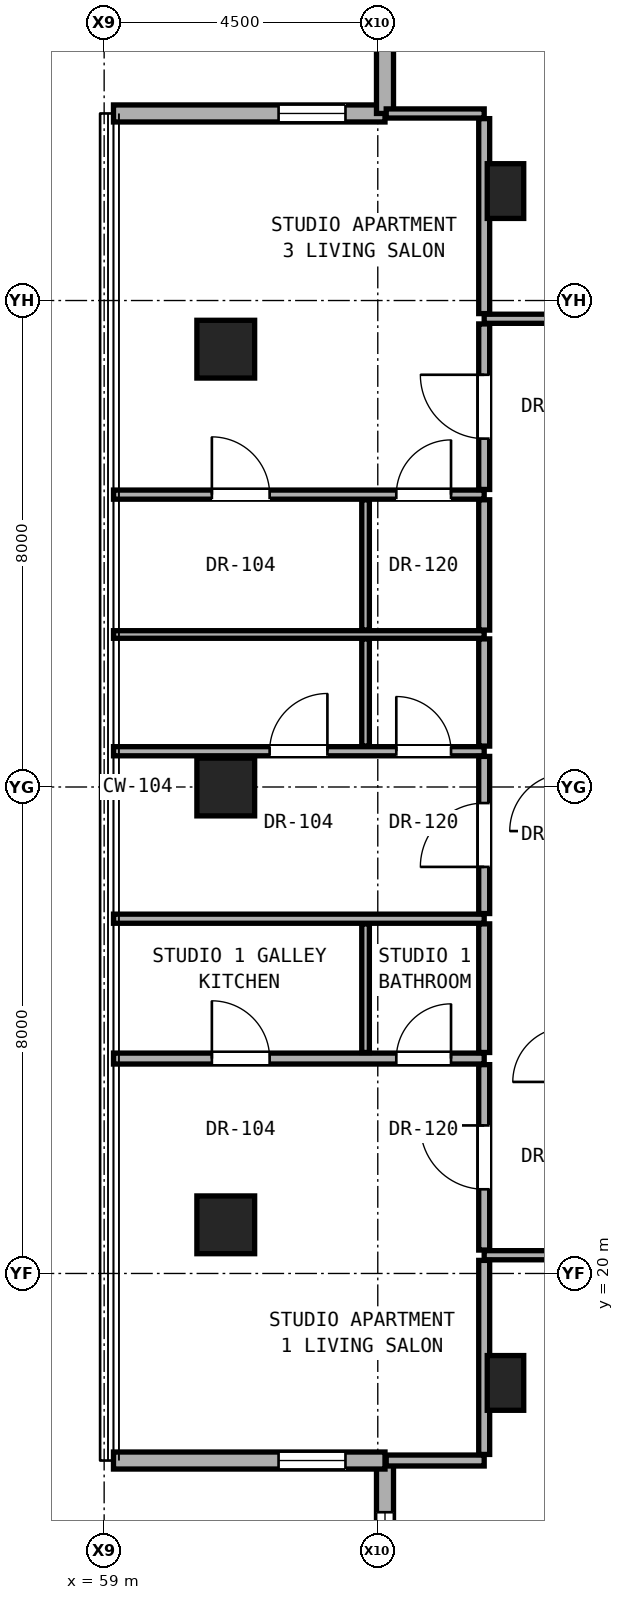
"""IFC4 building model, lengths in metres.
Left out: names, types, materials, properties, quantities, classifications, styles, units other than length and angle.
Written with IfcOpenShell. Run it as: python <this file> out.ifc"""

import sys

from ifc_helpers import new_model, si_unit, direction, frame, frame_2d, origin, origin_2d, place, context, subcontext, project, spatial, rectangle, hollow_rectangle, extrude, element, fill, save


model = new_model("IFC4")
c1 = context("Model", 3, precision=1e-05, world=origin(), true_north=direction((0.0, 1.0)))
c2 = subcontext(c1, "Body", "Model", "MODEL_VIEW")
j1 = project(units=[si_unit("LENGTHUNIT", "METRE"), si_unit("PLANEANGLEUNIT", "RADIAN")], contexts=[c1])
p1 = place(None, origin())
s1 = spatial("IfcSite", under=j1, at=p1, CompositionType="ELEMENT")
p2 = place(p1, origin())
s2 = spatial("IfcBuilding", under=s1, at=p2, CompositionType="ELEMENT")
p3 = place(p2, frame((0.0, 0.0, 164.15)))
s3 = spatial("IfcBuildingStorey", under=s2, at=p3, CompositionType="ELEMENT", Elevation=164.15)
for number, where, z_axis, x_axis in (
    (1, (61.0, 20.8, 0.0), (0.0, 0.0, 1.0), (1.0, 0.0, 0.0)),
    (2, (61.0, 28.0, 0.0), (0.0, 0.0, 1.0), (1.0, 0.0, 0.0)),
    (3, (61.0, 35.2, 0.0), (0.0, 0.0, 1.0), (1.0, 0.0, 0.0)),
):
    element("IfcColumn", number, at=place(p3, frame(where, z_axis=z_axis, x_axis=x_axis)), inside=s3, PredefinedType="COLUMN", context=c2, shape_type="SweptSolid", body=[
        extrude(hollow_rectangle(XDim=0.95, YDim=0.95, WallThickness=0.05, at=origin_2d()), origin(), (0.0, 0.0, 1.0), 3.25),
    ])
for number, where, z_axis, x_axis in (
    (4, (65.6, 18.2, 0.0), (0.0, 0.0, 1.0), (1.0, 0.0, 0.0)),
    (5, (65.6, 37.8, 0.0), (0.0, 0.0, 1.0), (1.0, 0.0, 0.0)),
):
    element("IfcColumn", number, at=place(p3, frame(where, z_axis=z_axis, x_axis=x_axis)), inside=s3, PredefinedType="PILASTER", context=c2, shape_type="SweptSolid", body=[
        extrude(rectangle(XDim=0.6, YDim=0.9, at=origin_2d()), origin(), (0.0, 0.0, 1.0), 3.25),
    ])
p4 = place(p3, frame((63.619, 16.924, 0.0), z_axis=(0.0, 0.0, 1.0), x_axis=(0.0, -1.0, 0.0)))
e6 = element("IfcWall", 6, at=p4, inside=s3, PredefinedType="SOLIDWALL", context=c2, shape_type="SweptSolid", body=[
    extrude(rectangle(XDim=4.465, YDim=0.28, at=frame_2d((2.233, 0.0))), origin(), (0.0, 0.0, 1.0), 3.03),
])
p5 = place(p4, frame((0.85, 0.0, 0.68)))
e7 = element("IfcOpeningElement", 7, at=p5, cuts=e6, PredefinedType="OPENING", context=c2, shape_type="SweptSolid", body=[
    extrude(rectangle(XDim=1.35, YDim=2.2, at=frame_2d((0.675, 1.1))), frame((0.0, 0.15, 0.0), z_axis=(0.0, -1.0, 0.0), x_axis=(1.0, 0.0, 0.0)), (0.0, 0.0, 1.0), 0.3),
])
p6 = place(p3, frame((59.154, 16.924, 0.0), z_axis=(0.0, 0.0, 1.0), x_axis=(1.0, 0.0, 0.0)))
e8 = element("IfcWall", 8, at=p6, inside=s3, PredefinedType="SOLIDWALL", context=c2, shape_type="SweptSolid", body=[
    extrude(rectangle(XDim=4.465, YDim=0.28, at=frame_2d((2.232, 0.0))), origin(), (0.0, 0.0, 1.0), 3.03),
])
p7 = place(p6, frame((2.715, 0.0, 0.85)))
e9 = element("IfcOpeningElement", 9, at=p7, cuts=e8, PredefinedType="OPENING", context=c2, shape_type="SweptSolid", body=[
    extrude(rectangle(XDim=1.1, YDim=2.0, at=frame_2d((0.55, 1.0))), frame((0.0, 0.15, 0.0), z_axis=(0.0, -1.0, 0.0), x_axis=(1.0, 0.0, 0.0)), (0.0, 0.0, 1.0), 0.3),
])
p8 = place(p3, frame((63.619, 39.076, 0.0), z_axis=(0.0, 0.0, 1.0), x_axis=(-1.0, 0.0, 0.0)))
e10 = element("IfcWall", 10, at=p8, inside=s3, PredefinedType="SOLIDWALL", context=c2, shape_type="SweptSolid", body=[
    extrude(rectangle(XDim=4.465, YDim=0.28, at=frame_2d((2.232, 0.0))), origin(), (0.0, 0.0, 1.0), 3.03),
])
p9 = place(p8, frame((0.65, 0.0, 0.85)))
e11 = element("IfcOpeningElement", 11, at=p9, cuts=e10, PredefinedType="OPENING", context=c2, shape_type="SweptSolid", body=[
    extrude(rectangle(XDim=1.1, YDim=2.0, at=frame_2d((0.55, 1.0))), frame((0.0, 0.15, 0.0), z_axis=(0.0, -1.0, 0.0), x_axis=(1.0, 0.0, 0.0)), (0.0, 0.0, 1.0), 0.3),
])
p10 = place(p3, frame((63.619, 43.542, 0.0), z_axis=(0.0, 0.0, 1.0), x_axis=(0.0, -1.0, 0.0)))
e12 = element("IfcWall", 12, at=p10, inside=s3, PredefinedType="SOLIDWALL", context=c2, shape_type="SweptSolid", body=[
    extrude(rectangle(XDim=4.465, YDim=0.28, at=frame_2d((2.233, 0.0))), origin(), (0.0, 0.0, 1.0), 3.03),
])
p11 = place(p3, frame((63.639, 16.924, 0.0), z_axis=(0.0, 0.0, 1.0), x_axis=(1.0, 0.0, 0.0)))
e13 = element("IfcWall", 13, at=p11, inside=s3, PredefinedType="PARTITIONING", context=c2, shape_type="SweptSolid", body=[
    extrude(rectangle(XDim=1.611, YDim=0.18, at=frame_2d((0.806, 0.0))), origin(), (0.0, 0.0, 1.0), 3.05),
])
p12 = place(p3, frame((65.25, 20.3, 0.0), z_axis=(0.0, 0.0, 1.0), x_axis=(1.0, 0.0, 0.0)))
e14 = element("IfcWall", 14, at=p12, inside=s3, PredefinedType="PARTITIONING", context=c2, shape_type="SweptSolid", body=[
    extrude(rectangle(XDim=1.37, YDim=0.15, at=frame_2d((0.685, 0.0))), origin(), (0.0, 0.0, 1.0), 3.05),
])
p13 = place(p3, frame((59.154, 23.534, 0.0), z_axis=(0.0, 0.0, 1.0), x_axis=(1.0, 0.0, 0.0)))
e15 = element("IfcWall", 15, at=p13, inside=s3, PredefinedType="PARTITIONING", context=c2, shape_type="SweptSolid", body=[
    extrude(rectangle(XDim=6.096, YDim=0.18, at=frame_2d((3.048, 0.0))), origin(), (0.0, 0.0, 1.0), 2.269),
])
p14 = place(p13, frame((1.617, 0.0, 0.0)))
e16 = element("IfcOpeningElement", 16, at=p14, cuts=e15, PredefinedType="OPENING", context=c2, shape_type="SweptSolid", body=[
    extrude(rectangle(XDim=0.95, YDim=2.15, at=frame_2d((0.475, 1.075))), frame((0.0, 0.1, 0.0), z_axis=(0.0, -1.0, 0.0), x_axis=(1.0, 0.0, 0.0)), (0.0, 0.0, 1.0), 0.2),
])
p15 = place(p13, frame((4.65, 0.0, 0.0)))
e17 = element("IfcOpeningElement", 17, at=p15, cuts=e15, PredefinedType="OPENING", context=c2, shape_type="SweptSolid", body=[
    extrude(rectangle(XDim=0.9, YDim=2.1, at=frame_2d((0.45, 1.05))), frame((0.0, 0.1, 0.0), z_axis=(0.0, -1.0, 0.0), x_axis=(1.0, 0.0, 0.0)), (0.0, 0.0, 1.0), 0.2),
])
p16 = place(p3, frame((59.154, 25.834, 0.0), z_axis=(0.0, 0.0, 1.0), x_axis=(1.0, 0.0, 0.0)))
e18 = element("IfcWall", 18, at=p16, inside=s3, PredefinedType="PARTITIONING", context=c2, shape_type="SweptSolid", body=[
    extrude(rectangle(XDim=6.096, YDim=0.15, at=frame_2d((3.048, 0.0))), origin(), (0.0, 0.0, 1.0), 2.269),
])
p17 = place(p3, frame((59.154, 28.588, 0.0), z_axis=(0.0, 0.0, 1.0), x_axis=(1.0, 0.0, 0.0)))
e19 = element("IfcWall", 19, at=p17, inside=s3, PredefinedType="PARTITIONING", context=c2, shape_type="SweptSolid", body=[
    extrude(rectangle(XDim=6.096, YDim=0.15, at=frame_2d((3.048, 0.0))), origin(), (0.0, 0.0, 1.0), 2.269),
])
p18 = place(p17, frame((2.567, 0.0, 0.0)))
e20 = element("IfcOpeningElement", 20, at=p18, cuts=e19, PredefinedType="OPENING", context=c2, shape_type="SweptSolid", body=[
    extrude(rectangle(XDim=0.95, YDim=2.15, at=frame_2d((0.475, 1.075))), frame((0.0, 0.085, 0.0), z_axis=(0.0, -1.0, 0.0), x_axis=(1.0, 0.0, 0.0)), (0.0, 0.0, 1.0), 0.17),
])
p19 = place(p17, frame((4.65, 0.0, 0.0)))
e21 = element("IfcOpeningElement", 21, at=p19, cuts=e19, PredefinedType="OPENING", context=c2, shape_type="SweptSolid", body=[
    extrude(rectangle(XDim=0.9, YDim=2.1, at=frame_2d((0.45, 1.05))), frame((0.0, 0.085, 0.0), z_axis=(0.0, -1.0, 0.0), x_axis=(1.0, 0.0, 0.0)), (0.0, 0.0, 1.0), 0.17),
])
p20 = place(p3, frame((59.154, 30.508, 0.0), z_axis=(0.0, 0.0, 1.0), x_axis=(1.0, 0.0, 0.0)))
e22 = element("IfcWall", 22, at=p20, inside=s3, PredefinedType="PARTITIONING", context=c2, shape_type="SweptSolid", body=[
    extrude(rectangle(XDim=6.096, YDim=0.125, at=frame_2d((3.048, 0.0))), origin(), (0.0, 0.0, 1.0), 2.269),
])
p21 = place(p3, frame((59.154, 32.808, 0.0), z_axis=(0.0, 0.0, 1.0), x_axis=(1.0, 0.0, 0.0)))
e23 = element("IfcWall", 23, at=p21, inside=s3, PredefinedType="PARTITIONING", context=c2, shape_type="SweptSolid", body=[
    extrude(rectangle(XDim=6.096, YDim=0.15, at=frame_2d((3.048, 0.0))), origin(), (0.0, 0.0, 1.0), 2.269),
])
p22 = place(p21, frame((1.617, 0.0, 0.0)))
e24 = element("IfcOpeningElement", 24, at=p22, cuts=e23, PredefinedType="OPENING", context=c2, shape_type="SweptSolid", body=[
    extrude(rectangle(XDim=0.95, YDim=2.15, at=frame_2d((0.475, 1.075))), frame((0.0, 0.085, 0.0), z_axis=(0.0, -1.0, 0.0), x_axis=(1.0, 0.0, 0.0)), (0.0, 0.0, 1.0), 0.17),
])
p23 = place(p21, frame((4.65, 0.0, 0.0)))
e25 = element("IfcOpeningElement", 25, at=p23, cuts=e23, PredefinedType="OPENING", context=c2, shape_type="SweptSolid", body=[
    extrude(rectangle(XDim=0.9, YDim=2.1, at=frame_2d((0.45, 1.05))), frame((0.0, 0.085, 0.0), z_axis=(0.0, -1.0, 0.0), x_axis=(1.0, 0.0, 0.0)), (0.0, 0.0, 1.0), 0.17),
])
p24 = place(p3, frame((65.25, 35.7, 0.0), z_axis=(0.0, 0.0, 1.0), x_axis=(1.0, 0.0, 0.0)))
e26 = element("IfcWall", 26, at=p24, inside=s3, PredefinedType="PARTITIONING", context=c2, shape_type="SweptSolid", body=[
    extrude(rectangle(XDim=1.37, YDim=0.15, at=frame_2d((0.685, 0.0))), origin(), (0.0, 0.0, 1.0), 3.05),
])
p25 = place(p3, frame((63.639, 39.076, 0.0), z_axis=(0.0, 0.0, 1.0), x_axis=(1.0, 0.0, 0.0)))
e27 = element("IfcWall", 27, at=p25, inside=s3, PredefinedType="PARTITIONING", context=c2, shape_type="SweptSolid", body=[
    extrude(rectangle(XDim=1.611, YDim=0.15, at=frame_2d((0.806, 0.0))), origin(), (0.0, 0.0, 1.0), 3.05),
])
p26 = place(p3, frame((63.299, 23.634, 0.0), z_axis=(0.0, 0.0, 1.0), x_axis=(0.0, 1.0, 0.0)))
e28 = element("IfcWall", 28, at=p26, inside=s3, PredefinedType="PARTITIONING", context=c2, shape_type="SweptSolid", body=[
    extrude(rectangle(XDim=2.115, YDim=0.125, at=frame_2d((1.058, 0.0))), origin(), (0.0, 0.0, 1.0), 3.05),
])
p27 = place(p3, frame((63.299, 28.673, 0.0), z_axis=(0.0, 0.0, 1.0), x_axis=(0.0, 1.0, 0.0)))
e29 = element("IfcWall", 29, at=p27, inside=s3, PredefinedType="PARTITIONING", context=c2, shape_type="SweptSolid", body=[
    extrude(rectangle(XDim=1.762, YDim=0.125, at=frame_2d((0.881, 0.0))), origin(), (0.0, 0.0, 1.0), 3.05),
])
p28 = place(p3, frame((63.299, 30.581, 0.0), z_axis=(0.0, 0.0, 1.0), x_axis=(0.0, 1.0, 0.0)))
e30 = element("IfcWall", 30, at=p28, inside=s3, PredefinedType="PARTITIONING", context=c2, shape_type="SweptSolid", body=[
    extrude(rectangle(XDim=2.142, YDim=0.125, at=frame_2d((1.071, 0.0))), origin(), (0.0, 0.0, 1.0), 3.05),
])
p29 = place(p3, frame((65.25, 17.024, 0.0), z_axis=(0.0, 0.0, 1.0), x_axis=(0.0, 1.0, 0.0)))
e31 = element("IfcWall", 31, at=p29, inside=s3, PredefinedType="PARTITIONING", context=c2, shape_type="SweptSolid", body=[
    extrude(rectangle(XDim=3.191, YDim=0.18, at=frame_2d((1.596, 0.0))), origin(), (0.0, 0.0, 1.0), 2.493),
])
p30 = place(p3, frame((65.25, 20.385, 0.0), z_axis=(0.0, 0.0, 1.0), x_axis=(0.0, 1.0, 0.0)))
e32 = element("IfcWall", 32, at=p30, inside=s3, PredefinedType="PARTITIONING", context=c2, shape_type="SweptSolid", body=[
    extrude(rectangle(XDim=3.049, YDim=0.18, at=frame_2d((1.524, 0.0))), origin(), (0.0, 0.0, 1.0), 2.442),
])
p31 = place(p30, frame((1.0, 0.0, 0.0)))
e33 = element("IfcOpeningElement", 33, at=p31, cuts=e32, PredefinedType="OPENING", context=c2, shape_type="SweptSolid", body=[
    extrude(rectangle(XDim=1.05, YDim=2.2, at=frame_2d((0.525, 1.1))), frame((0.0, 0.1, 0.0), z_axis=(0.0, -1.0, 0.0), x_axis=(1.0, 0.0, 0.0)), (0.0, 0.0, 1.0), 0.2),
])
p32 = place(p3, frame((65.25, 23.634, 0.0), z_axis=(0.0, 0.0, 1.0), x_axis=(0.0, 1.0, 0.0)))
e34 = element("IfcWall", 34, at=p32, inside=s3, PredefinedType="PARTITIONING", context=c2, shape_type="SweptSolid", body=[
    extrude(rectangle(XDim=2.115, YDim=0.18, at=frame_2d((1.058, 0.0))), origin(), (0.0, 0.0, 1.0), 3.05),
])
p33 = place(p3, frame((65.25, 25.919, 0.0), z_axis=(0.0, 0.0, 1.0), x_axis=(0.0, 1.0, 0.0)))
e35 = element("IfcWall", 35, at=p33, inside=s3, PredefinedType="PARTITIONING", context=c2, shape_type="SweptSolid", body=[
    extrude(rectangle(XDim=2.584, YDim=0.18, at=frame_2d((1.292, 0.0))), origin(), (0.0, 0.0, 1.0), 2.346),
])
p34 = place(p33, frame((0.767, 0.0, 0.0)))
e36 = element("IfcOpeningElement", 36, at=p34, cuts=e35, PredefinedType="OPENING", context=c2, shape_type="SweptSolid", body=[
    extrude(rectangle(XDim=1.05, YDim=2.2, at=frame_2d((0.525, 1.1))), frame((0.0, 0.1, 0.0), z_axis=(0.0, -1.0, 0.0), x_axis=(1.0, 0.0, 0.0)), (0.0, 0.0, 1.0), 0.2),
])
p35 = place(p3, frame((65.25, 28.673, 0.0), z_axis=(0.0, 0.0, 1.0), x_axis=(0.0, 1.0, 0.0)))
e37 = element("IfcWall", 37, at=p35, inside=s3, PredefinedType="PARTITIONING", context=c2, shape_type="SweptSolid", body=[
    extrude(rectangle(XDim=1.762, YDim=0.18, at=frame_2d((0.881, 0.0))), origin(), (0.0, 0.0, 1.0), 3.05),
])
p36 = place(p3, frame((65.25, 30.581, 0.0), z_axis=(0.0, 0.0, 1.0), x_axis=(0.0, 1.0, 0.0)))
e38 = element("IfcWall", 38, at=p36, inside=s3, PredefinedType="PARTITIONING", context=c2, shape_type="SweptSolid", body=[
    extrude(rectangle(XDim=2.142, YDim=0.18, at=frame_2d((1.071, 0.0))), origin(), (0.0, 0.0, 1.0), 3.05),
])
p37 = place(p3, frame((65.25, 32.893, 0.0), z_axis=(0.0, 0.0, 1.0), x_axis=(0.0, 1.0, 0.0)))
e39 = element("IfcWall", 39, at=p37, inside=s3, PredefinedType="PARTITIONING", context=c2, shape_type="SweptSolid", body=[
    extrude(rectangle(XDim=2.722, YDim=0.18, at=frame_2d((1.361, 0.0))), origin(), (0.0, 0.0, 1.0), 2.442),
])
p38 = place(p37, frame((0.836, 0.0, 0.0)))
e40 = element("IfcOpeningElement", 40, at=p38, cuts=e39, PredefinedType="OPENING", context=c2, shape_type="SweptSolid", body=[
    extrude(rectangle(XDim=1.05, YDim=2.2, at=frame_2d((0.525, 1.1))), frame((0.0, 0.1, 0.0), z_axis=(0.0, -1.0, 0.0), x_axis=(1.0, 0.0, 0.0)), (0.0, 0.0, 1.0), 0.2),
])
p39 = place(p3, frame((65.25, 35.785, 0.0), z_axis=(0.0, 0.0, 1.0), x_axis=(0.0, 1.0, 0.0)))
e41 = element("IfcWall", 41, at=p39, inside=s3, PredefinedType="PARTITIONING", context=c2, shape_type="SweptSolid", body=[
    extrude(rectangle(XDim=3.206, YDim=0.18, at=frame_2d((1.603, 0.0))), origin(), (0.0, 0.0, 1.0), 2.493),
])
p40 = place(p5, origin())
e42 = element("IfcWindow", 42, at=p40, inside=s3, PartitioningType="SINGLE_PANEL", PredefinedType="WINDOW", context=c2, shape_type="SweptSolid", body=[
    extrude(rectangle(XDim=1.35, YDim=2.2, at=frame_2d((0.675, 1.1))), frame((0.0, 0.03, 0.0), z_axis=(0.0, -1.0, 0.0), x_axis=(1.0, 0.0, 0.0)), (0.0, 0.0, 1.0), 0.06),
])
fill(e7, e42)
p41 = place(p7, origin())
e43 = element("IfcWindow", 43, at=p41, inside=s3, PartitioningType="SINGLE_PANEL", PredefinedType="WINDOW", context=c2, shape_type="SweptSolid", body=[
    extrude(rectangle(XDim=1.1, YDim=2.0, at=frame_2d((0.55, 1.0))), frame((0.0, 0.03, 0.0), z_axis=(0.0, -1.0, 0.0), x_axis=(1.0, 0.0, 0.0)), (0.0, 0.0, 1.0), 0.06),
])
fill(e9, e43)
p42 = place(p9, origin())
e44 = element("IfcWindow", 44, at=p42, inside=s3, PartitioningType="SINGLE_PANEL", PredefinedType="WINDOW", context=c2, shape_type="SweptSolid", body=[
    extrude(rectangle(XDim=1.1, YDim=2.0, at=frame_2d((0.55, 1.0))), frame((0.0, 0.03, 0.0), z_axis=(0.0, -1.0, 0.0), x_axis=(1.0, 0.0, 0.0)), (0.0, 0.0, 1.0), 0.06),
])
fill(e11, e44)
p43 = place(p31, origin())
e45 = element("IfcDoor", 45, at=p43, inside=s3, OperationType="SINGLE_SWING_RIGHT", PredefinedType="DOOR", context=c2, shape_type="SweptSolid", body=[
    extrude(rectangle(XDim=1.05, YDim=2.2, at=frame_2d((0.525, 1.1))), frame((0.0, 0.025, 0.0), z_axis=(0.0, -1.0, 0.0), x_axis=(1.0, 0.0, 0.0)), (0.0, 0.0, 1.0), 0.05),
])
fill(e33, e45)
p44 = place(p14, origin())
e46 = element("IfcDoor", 46, at=p44, inside=s3, OperationType="SINGLE_SWING_LEFT", PredefinedType="DOOR", context=c2, shape_type="SweptSolid", body=[
    extrude(rectangle(XDim=0.95, YDim=2.15, at=frame_2d((0.475, 1.075))), frame((0.0, 0.025, 0.0), z_axis=(0.0, -1.0, 0.0), x_axis=(1.0, 0.0, 0.0)), (0.0, 0.0, 1.0), 0.05),
])
fill(e16, e46)
p45 = place(p15, origin())
e47 = element("IfcDoor", 47, at=p45, inside=s3, OperationType="SINGLE_SWING_RIGHT", PredefinedType="DOOR", context=c2, shape_type="SweptSolid", body=[
    extrude(rectangle(XDim=0.9, YDim=2.1, at=frame_2d((0.45, 1.05))), frame((0.0, 0.025, 0.0), z_axis=(0.0, -1.0, 0.0), x_axis=(1.0, 0.0, 0.0)), (0.0, 0.0, 1.0), 0.05),
])
fill(e17, e47)
p46 = place(p34, origin())
e48 = element("IfcDoor", 48, at=p46, inside=s3, OperationType="SINGLE_SWING_LEFT", PredefinedType="DOOR", context=c2, shape_type="SweptSolid", body=[
    extrude(rectangle(XDim=1.05, YDim=2.2, at=frame_2d((0.525, 1.1))), frame((0.0, 0.025, 0.0), z_axis=(0.0, -1.0, 0.0), x_axis=(1.0, 0.0, 0.0)), (0.0, 0.0, 1.0), 0.05),
])
fill(e36, e48)
p47 = place(p18, origin())
e49 = element("IfcDoor", 49, at=p47, inside=s3, OperationType="SINGLE_SWING_RIGHT", PredefinedType="DOOR", context=c2, shape_type="SweptSolid", body=[
    extrude(rectangle(XDim=0.95, YDim=2.15, at=frame_2d((0.475, 1.075))), frame((0.0, 0.025, 0.0), z_axis=(0.0, -1.0, 0.0), x_axis=(1.0, 0.0, 0.0)), (0.0, 0.0, 1.0), 0.05),
])
fill(e20, e49)
p48 = place(p19, origin())
e50 = element("IfcDoor", 50, at=p48, inside=s3, OperationType="SINGLE_SWING_LEFT", PredefinedType="DOOR", context=c2, shape_type="SweptSolid", body=[
    extrude(rectangle(XDim=0.9, YDim=2.1, at=frame_2d((0.45, 1.05))), frame((0.0, 0.025, 0.0), z_axis=(0.0, -1.0, 0.0), x_axis=(1.0, 0.0, 0.0)), (0.0, 0.0, 1.0), 0.05),
])
fill(e21, e50)
p49 = place(p38, origin())
e51 = element("IfcDoor", 51, at=p49, inside=s3, OperationType="SINGLE_SWING_RIGHT", PredefinedType="DOOR", context=c2, shape_type="SweptSolid", body=[
    extrude(rectangle(XDim=1.05, YDim=2.2, at=frame_2d((0.525, 1.1))), frame((0.0, 0.025, 0.0), z_axis=(0.0, -1.0, 0.0), x_axis=(1.0, 0.0, 0.0)), (0.0, 0.0, 1.0), 0.05),
])
fill(e40, e51)
p50 = place(p22, origin())
e52 = element("IfcDoor", 52, at=p50, inside=s3, OperationType="SINGLE_SWING_LEFT", PredefinedType="DOOR", context=c2, shape_type="SweptSolid", body=[
    extrude(rectangle(XDim=0.95, YDim=2.15, at=frame_2d((0.475, 1.075))), frame((0.0, 0.025, 0.0), z_axis=(0.0, -1.0, 0.0), x_axis=(1.0, 0.0, 0.0)), (0.0, 0.0, 1.0), 0.05),
])
fill(e24, e52)
p51 = place(p23, origin())
e53 = element("IfcDoor", 53, at=p51, inside=s3, OperationType="SINGLE_SWING_RIGHT", PredefinedType="DOOR", context=c2, shape_type="SweptSolid", body=[
    extrude(rectangle(XDim=0.9, YDim=2.1, at=frame_2d((0.45, 1.05))), frame((0.0, 0.025, 0.0), z_axis=(0.0, -1.0, 0.0), x_axis=(1.0, 0.0, 0.0)), (0.0, 0.0, 1.0), 0.05),
])
fill(e25, e53)
save(model, sys.argv[1])
